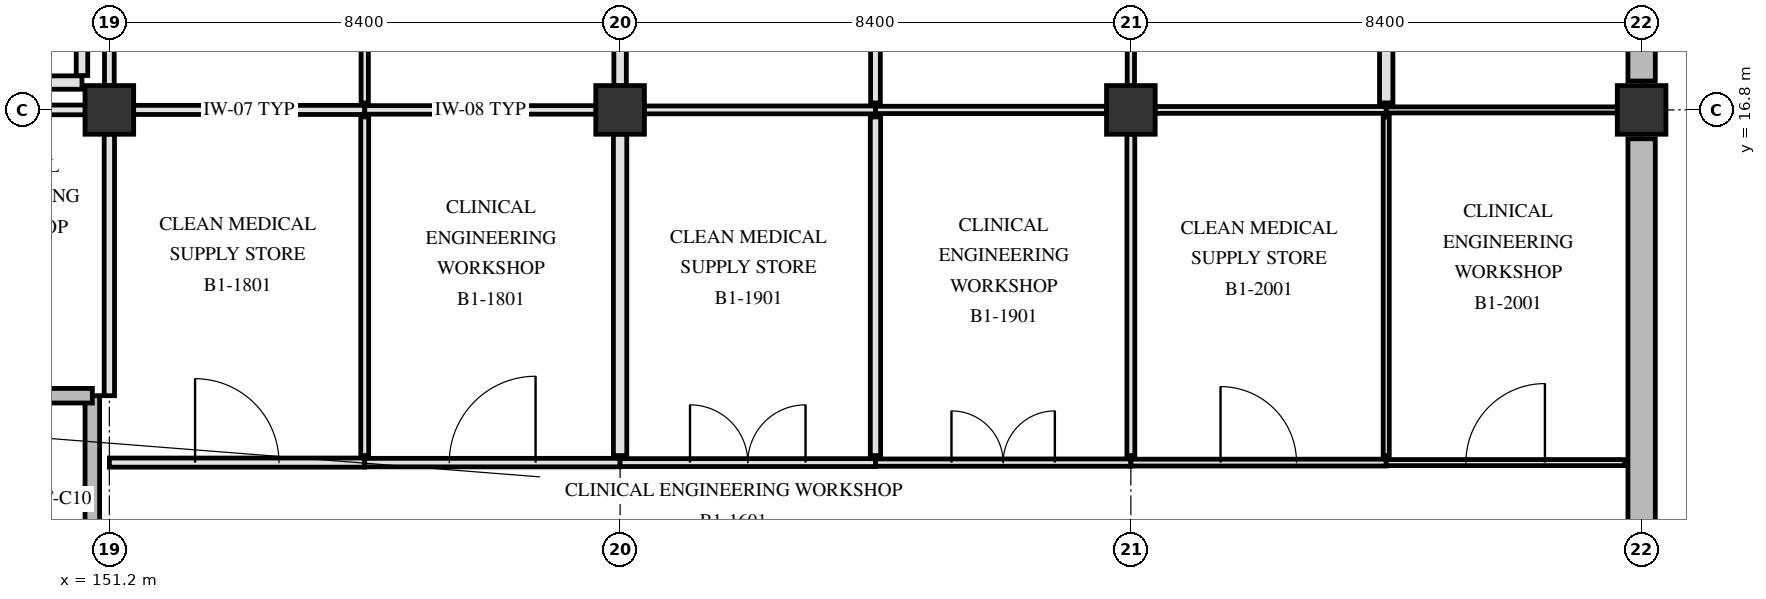
"""IFC4 building model, lengths in metres.
Left out: names, types, materials, properties, quantities, classifications, styles, units other than length and angle.
Written with IfcOpenShell. Run it as: python <this file> out.ifc"""

import sys

from ifc_helpers import new_model, si_unit, direction, frame, frame_2d, origin, origin_2d, place, context, subcontext, project, spatial, rectangle, extrude, element, fill, save


model = new_model("IFC4")
c1 = context("Model", 3, precision=1e-05, world=origin(), true_north=direction((0.0, 1.0)))
c2 = subcontext(c1, "Body", "Model", "MODEL_VIEW")
j1 = project(units=[si_unit("LENGTHUNIT", "METRE"), si_unit("PLANEANGLEUNIT", "RADIAN")], contexts=[c1])
p1 = place(None, origin())
s1 = spatial("IfcSite", under=j1, at=p1, CompositionType="ELEMENT")
p2 = place(p1, origin())
s2 = spatial("IfcBuilding", under=s1, at=p2, CompositionType="ELEMENT")
p3 = place(p2, frame((0.0, 0.0, -5.4)))
s3 = spatial("IfcBuildingStorey", under=s2, at=p3, CompositionType="ELEMENT", Elevation=-5.4)
for number, where, z_axis, x_axis in (
    (1, (151.2, 16.8, 0.0), (0.0, 0.0, 1.0), (1.0, 0.0, 0.0)),
    (2, (159.6, 16.8, 0.0), (0.0, 0.0, 1.0), (1.0, 0.0, 0.0)),
    (3, (168.0, 16.8, 0.0), (0.0, 0.0, 1.0), (1.0, 0.0, 0.0)),
    (4, (176.4, 16.8, 0.0), (0.0, 0.0, 1.0), (1.0, 0.0, 0.0)),
):
    element("IfcColumn", number, at=place(p3, frame(where, z_axis=z_axis, x_axis=x_axis)), inside=s3, PredefinedType="COLUMN", context=c2, shape_type="SweptSolid", body=[
        extrude(rectangle(XDim=0.8, YDim=0.8, at=origin_2d()), origin(), (0.0, 0.0, 1.0), 5.4),
    ])
p4 = place(p3, frame((176.4, 24.725, 0.0), z_axis=(0.0, 0.0, 1.0), x_axis=(0.0, -1.0, 0.0)))
e5 = element("IfcWall", 5, at=p4, inside=s3, PredefinedType="SOLIDWALL", context=c2, shape_type="SweptSolid", body=[
    extrude(rectangle(XDim=7.45, YDim=0.45, at=frame_2d((3.725, 0.0))), origin(), (0.0, 0.0, 1.0), 5.08),
])
p5 = place(p3, frame((176.4, 16.325, 0.0), z_axis=(0.0, 0.0, 1.0), x_axis=(0.0, -1.0, 0.0)))
e6 = element("IfcWall", 6, at=p5, inside=s3, PredefinedType="SOLIDWALL", context=c2, shape_type="SweptSolid", body=[
    extrude(rectangle(XDim=7.45, YDim=0.45, at=frame_2d((3.725, 0.0))), origin(), (0.0, 0.0, 1.0), 5.08),
])
p6 = place(p3, frame((150.92, 8.78, 0.0), z_axis=(0.0, 0.0, 1.0), x_axis=(0.0, 1.0, 0.0)))
e7 = element("IfcWall", 7, at=p6, inside=s3, PredefinedType="SHEAR", context=c2, shape_type="SweptSolid", body=[
    extrude(rectangle(XDim=3.32, YDim=0.24, at=frame_2d((1.66, 0.0))), origin(), (0.0, 0.0, 1.0), 5.08),
])
p7 = place(p3, frame((143.1, 12.1, 0.0), z_axis=(0.0, 0.0, 1.0), x_axis=(1.0, 0.0, 0.0)))
e8 = element("IfcWall", 8, at=p7, inside=s3, PredefinedType="SHEAR", context=c2, shape_type="SweptSolid", body=[
    extrude(rectangle(XDim=7.82, YDim=0.24, at=frame_2d((3.91, 0.0))), origin(), (0.0, 0.0, 1.0), 5.08),
])
p8 = place(p7, frame((0.25, 0.0, 0.0)))
e9 = element("IfcOpeningElement", 9, at=p8, cuts=e8, PredefinedType="OPENING", context=c2, shape_type="SweptSolid", body=[
    extrude(rectangle(XDim=1.45, YDim=2.2, at=frame_2d((0.725, 1.1))), frame((0.0, 0.13, 0.0), z_axis=(0.0, -1.0, 0.0), x_axis=(1.0, 0.0, 0.0)), (0.0, 0.0, 1.0), 0.26),
])
p9 = place(p3, frame((151.2, 11.0, 0.0), z_axis=(0.0, 0.0, 1.0), x_axis=(1.0, 0.0, 0.0)))
e10 = element("IfcWall", 10, at=p9, inside=s3, PredefinedType="PARTITIONING", context=c2, shape_type="SweptSolid", body=[
    extrude(rectangle(XDim=4.2, YDim=0.15, at=frame_2d((2.1, 0.0))), origin(), (0.0, 0.0, 1.0), 4.47),
])
p10 = place(p9, frame((1.41, 0.0, 0.0)))
e11 = element("IfcOpeningElement", 11, at=p10, cuts=e10, PredefinedType="OPENING", context=c2, shape_type="SweptSolid", body=[
    extrude(rectangle(XDim=1.38, YDim=2.22, at=frame_2d((0.69, 1.11))), frame((0.0, 0.085, 0.0), z_axis=(0.0, -1.0, 0.0), x_axis=(1.0, 0.0, 0.0)), (0.0, 0.0, 1.0), 0.17),
])
p11 = place(p3, frame((155.4, 11.0, 0.0), z_axis=(0.0, 0.0, 1.0), x_axis=(1.0, 0.0, 0.0)))
e12 = element("IfcWall", 12, at=p11, inside=s3, PredefinedType="PARTITIONING", context=c2, shape_type="SweptSolid", body=[
    extrude(rectangle(XDim=4.2, YDim=0.14, at=frame_2d((2.1, 0.0))), origin(), (0.0, 0.0, 1.0), 4.47),
])
p12 = place(p11, frame((1.39, 0.0, 0.0)))
e13 = element("IfcOpeningElement", 13, at=p12, cuts=e12, PredefinedType="OPENING", context=c2, shape_type="SweptSolid", body=[
    extrude(rectangle(XDim=1.42, YDim=2.22, at=frame_2d((0.71, 1.11))), frame((0.0, 0.08, 0.0), z_axis=(0.0, -1.0, 0.0), x_axis=(1.0, 0.0, 0.0)), (0.0, 0.0, 1.0), 0.16),
])
p13 = place(p3, frame((159.6, 11.0, 0.0), z_axis=(0.0, 0.0, 1.0), x_axis=(1.0, 0.0, 0.0)))
e14 = element("IfcWall", 14, at=p13, inside=s3, PredefinedType="PARTITIONING", context=c2, shape_type="SweptSolid", body=[
    extrude(rectangle(XDim=4.2, YDim=0.13, at=frame_2d((2.1, 0.0))), origin(), (0.0, 0.0, 1.0), 4.47),
])
p14 = place(p13, frame((1.15, 0.0, 0.0)))
e15 = element("IfcOpeningElement", 15, at=p14, cuts=e14, PredefinedType="OPENING", context=c2, shape_type="SweptSolid", body=[
    extrude(rectangle(XDim=1.9, YDim=2.3, at=frame_2d((0.95, 1.15))), frame((0.0, 0.075, 0.0), z_axis=(0.0, -1.0, 0.0), x_axis=(1.0, 0.0, 0.0)), (0.0, 0.0, 1.0), 0.15),
])
p15 = place(p3, frame((163.8, 11.0, 0.0), z_axis=(0.0, 0.0, 1.0), x_axis=(1.0, 0.0, 0.0)))
e16 = element("IfcWall", 16, at=p15, inside=s3, PredefinedType="PARTITIONING", context=c2, shape_type="SweptSolid", body=[
    extrude(rectangle(XDim=4.2, YDim=0.12, at=frame_2d((2.1, 0.0))), origin(), (0.0, 0.0, 1.0), 4.47),
])
p16 = place(p15, frame((1.25, 0.0, 0.0)))
e17 = element("IfcOpeningElement", 17, at=p16, cuts=e16, PredefinedType="OPENING", context=c2, shape_type="SweptSolid", body=[
    extrude(rectangle(XDim=1.7, YDim=2.25, at=frame_2d((0.85, 1.125))), frame((0.0, 0.07, 0.0), z_axis=(0.0, -1.0, 0.0), x_axis=(1.0, 0.0, 0.0)), (0.0, 0.0, 1.0), 0.14),
])
p17 = place(p3, frame((168.0, 11.0, 0.0), z_axis=(0.0, 0.0, 1.0), x_axis=(1.0, 0.0, 0.0)))
e18 = element("IfcWall", 18, at=p17, inside=s3, PredefinedType="PARTITIONING", context=c2, shape_type="SweptSolid", body=[
    extrude(rectangle(XDim=4.2, YDim=0.112, at=frame_2d((2.1, 0.0))), origin(), (0.0, 0.0, 1.0), 4.47),
])
p18 = place(p17, frame((1.475, 0.0, 0.0)))
e19 = element("IfcOpeningElement", 19, at=p18, cuts=e18, PredefinedType="OPENING", context=c2, shape_type="SweptSolid", body=[
    extrude(rectangle(XDim=1.25, YDim=2.2, at=frame_2d((0.625, 1.1))), frame((0.0, 0.066, 0.0), z_axis=(0.0, -1.0, 0.0), x_axis=(1.0, 0.0, 0.0)), (0.0, 0.0, 1.0), 0.132),
])
p19 = place(p3, frame((172.2, 11.0, 0.0), z_axis=(0.0, 0.0, 1.0), x_axis=(1.0, 0.0, 0.0)))
e20 = element("IfcWall", 20, at=p19, inside=s3, PredefinedType="PARTITIONING", context=c2, shape_type="SweptSolid", body=[
    extrude(rectangle(XDim=3.92, YDim=0.1, at=frame_2d((1.96, 0.0))), origin(), (0.0, 0.0, 1.0), 5.07),
])
p20 = place(p19, frame((1.31, 0.0, 0.0)))
e21 = element("IfcOpeningElement", 21, at=p20, cuts=e20, PredefinedType="OPENING", context=c2, shape_type="SweptSolid", body=[
    extrude(rectangle(XDim=1.3, YDim=2.2, at=frame_2d((0.65, 1.1))), frame((0.0, 0.06, 0.0), z_axis=(0.0, -1.0, 0.0), x_axis=(1.0, 0.0, 0.0)), (0.0, 0.0, 1.0), 0.12),
])
p21 = place(p3, frame((147.0, 16.8, 0.0), z_axis=(0.0, 0.0, 1.0), x_axis=(1.0, 0.0, 0.0)))
e22 = element("IfcWall", 22, at=p21, inside=s3, PredefinedType="PARTITIONING", context=c2, shape_type="SweptSolid", body=[
    extrude(rectangle(XDim=3.805, YDim=0.16, at=frame_2d((1.902, 0.0))), origin(), (0.0, 0.0, 1.0), 4.42),
])
p22 = place(p3, frame((151.595, 16.8, 0.0), z_axis=(0.0, 0.0, 1.0), x_axis=(1.0, 0.0, 0.0)))
e23 = element("IfcWall", 23, at=p22, inside=s3, PredefinedType="PARTITIONING", context=c2, shape_type="SweptSolid", body=[
    extrude(rectangle(XDim=3.805, YDim=0.15, at=frame_2d((1.902, 0.0))), origin(), (0.0, 0.0, 1.0), 4.42),
])
p23 = place(p3, frame((155.4, 16.8, 0.0), z_axis=(0.0, 0.0, 1.0), x_axis=(1.0, 0.0, 0.0)))
e24 = element("IfcWall", 24, at=p23, inside=s3, PredefinedType="PARTITIONING", context=c2, shape_type="SweptSolid", body=[
    extrude(rectangle(XDim=3.805, YDim=0.14, at=frame_2d((1.903, 0.0))), origin(), (0.0, 0.0, 1.0), 4.42),
])
p24 = place(p3, frame((159.995, 16.8, 0.0), z_axis=(0.0, 0.0, 1.0), x_axis=(1.0, 0.0, 0.0)))
e25 = element("IfcWall", 25, at=p24, inside=s3, PredefinedType="PARTITIONING", context=c2, shape_type="SweptSolid", body=[
    extrude(rectangle(XDim=3.805, YDim=0.13, at=frame_2d((1.902, 0.0))), origin(), (0.0, 0.0, 1.0), 4.42),
])
p25 = place(p3, frame((163.8, 16.8, 0.0), z_axis=(0.0, 0.0, 1.0), x_axis=(1.0, 0.0, 0.0)))
e26 = element("IfcWall", 26, at=p25, inside=s3, PredefinedType="PARTITIONING", context=c2, shape_type="SweptSolid", body=[
    extrude(rectangle(XDim=3.805, YDim=0.12, at=frame_2d((1.902, 0.0))), origin(), (0.0, 0.0, 1.0), 4.42),
])
p26 = place(p3, frame((168.395, 16.8, 0.0), z_axis=(0.0, 0.0, 1.0), x_axis=(1.0, 0.0, 0.0)))
e27 = element("IfcWall", 27, at=p26, inside=s3, PredefinedType="PARTITIONING", context=c2, shape_type="SweptSolid", body=[
    extrude(rectangle(XDim=3.805, YDim=0.112, at=frame_2d((1.902, 0.0))), origin(), (0.0, 0.0, 1.0), 4.42),
])
p27 = place(p3, frame((172.2, 16.8, 0.0), z_axis=(0.0, 0.0, 1.0), x_axis=(1.0, 0.0, 0.0)))
e28 = element("IfcWall", 28, at=p27, inside=s3, PredefinedType="PARTITIONING", context=c2, shape_type="SweptSolid", body=[
    extrude(rectangle(XDim=3.805, YDim=0.1, at=frame_2d((1.902, 0.0))), origin(), (0.0, 0.0, 1.0), 4.42),
])
p28 = place(p3, frame((147.0, 17.25, 0.0), z_axis=(0.0, 0.0, 1.0), x_axis=(1.0, 0.0, 0.0)))
e29 = element("IfcWall", 29, at=p28, inside=s3, PredefinedType="PARTITIONING", context=c2, shape_type="SweptSolid", body=[
    extrude(rectangle(XDim=3.75, YDim=0.22, at=frame_2d((1.875, 0.0))), origin(), (0.0, 0.0, 1.0), 5.07),
])
p29 = place(p3, frame((150.75, 17.365, 0.0), z_axis=(0.0, 0.0, 1.0), x_axis=(0.0, 1.0, 0.0)))
e30 = element("IfcWall", 30, at=p29, inside=s3, PredefinedType="PARTITIONING", context=c2, shape_type="SweptSolid", body=[
    extrude(rectangle(XDim=1.77, YDim=0.19, at=frame_2d((0.885, 0.0))), origin(), (0.0, 0.0, 1.0), 5.07),
])
p30 = place(p3, frame((151.2, 12.1, 0.0), z_axis=(0.0, 0.0, 1.0), x_axis=(0.0, 1.0, 0.0)))
e31 = element("IfcWall", 31, at=p30, inside=s3, PredefinedType="PARTITIONING", context=c2, shape_type="SweptSolid", body=[
    extrude(rectangle(XDim=4.305, YDim=0.17, at=frame_2d((2.152, 0.0))), origin(), (0.0, 0.0, 1.0), 4.47),
])
p31 = place(p3, frame((151.2, 17.195, 0.0), z_axis=(0.0, 0.0, 1.0), x_axis=(0.0, 1.0, 0.0)))
e32 = element("IfcWall", 32, at=p31, inside=s3, PredefinedType="PARTITIONING", context=c2, shape_type="SweptSolid", body=[
    extrude(rectangle(XDim=5.29, YDim=0.16, at=frame_2d((2.645, 0.0))), origin(), (0.0, 0.0, 1.0), 4.47),
])
p32 = place(p3, frame((155.4, 11.115, 0.0), z_axis=(0.0, 0.0, 1.0), x_axis=(0.0, 1.0, 0.0)))
e33 = element("IfcWall", 33, at=p32, inside=s3, PredefinedType="PARTITIONING", context=c2, shape_type="SweptSolid", body=[
    extrude(rectangle(XDim=5.57, YDim=0.13, at=frame_2d((2.785, 0.0))), origin(), (0.0, 0.0, 1.0), 4.42),
])
p33 = place(p3, frame((155.4, 16.915, 0.0), z_axis=(0.0, 0.0, 1.0), x_axis=(0.0, 1.0, 0.0)))
e34 = element("IfcWall", 34, at=p33, inside=s3, PredefinedType="PARTITIONING", context=c2, shape_type="SweptSolid", body=[
    extrude(rectangle(XDim=5.57, YDim=0.12, at=frame_2d((2.785, 0.0))), origin(), (0.0, 0.0, 1.0), 4.42),
])
p34 = place(p3, frame((159.6, 11.115, 0.0), z_axis=(0.0, 0.0, 1.0), x_axis=(0.0, 1.0, 0.0)))
e35 = element("IfcWall", 35, at=p34, inside=s3, PredefinedType="PARTITIONING", context=c2, shape_type="SweptSolid", body=[
    extrude(rectangle(XDim=5.29, YDim=0.22, at=frame_2d((2.645, 0.0))), origin(), (0.0, 0.0, 1.0), 4.47),
])
p35 = place(p3, frame((159.6, 17.195, 0.0), z_axis=(0.0, 0.0, 1.0), x_axis=(0.0, 1.0, 0.0)))
e36 = element("IfcWall", 36, at=p35, inside=s3, PredefinedType="PARTITIONING", context=c2, shape_type="SweptSolid", body=[
    extrude(rectangle(XDim=5.29, YDim=0.205, at=frame_2d((2.645, 0.0))), origin(), (0.0, 0.0, 1.0), 4.47),
])
p36 = place(p3, frame((163.8, 11.115, 0.0), z_axis=(0.0, 0.0, 1.0), x_axis=(0.0, 1.0, 0.0)))
e37 = element("IfcWall", 37, at=p36, inside=s3, PredefinedType="PARTITIONING", context=c2, shape_type="SweptSolid", body=[
    extrude(rectangle(XDim=5.57, YDim=0.17, at=frame_2d((2.785, 0.0))), origin(), (0.0, 0.0, 1.0), 4.42),
])
p37 = place(p3, frame((163.8, 16.915, 0.0), z_axis=(0.0, 0.0, 1.0), x_axis=(0.0, 1.0, 0.0)))
e38 = element("IfcWall", 38, at=p37, inside=s3, PredefinedType="PARTITIONING", context=c2, shape_type="SweptSolid", body=[
    extrude(rectangle(XDim=5.57, YDim=0.16, at=frame_2d((2.785, 0.0))), origin(), (0.0, 0.0, 1.0), 4.42),
])
p38 = place(p3, frame((168.0, 11.115, 0.0), z_axis=(0.0, 0.0, 1.0), x_axis=(0.0, 1.0, 0.0)))
e39 = element("IfcWall", 39, at=p38, inside=s3, PredefinedType="PARTITIONING", context=c2, shape_type="SweptSolid", body=[
    extrude(rectangle(XDim=5.29, YDim=0.13, at=frame_2d((2.645, 0.0))), origin(), (0.0, 0.0, 1.0), 4.47),
])
p39 = place(p3, frame((168.0, 17.195, 0.0), z_axis=(0.0, 0.0, 1.0), x_axis=(0.0, 1.0, 0.0)))
e40 = element("IfcWall", 40, at=p39, inside=s3, PredefinedType="PARTITIONING", context=c2, shape_type="SweptSolid", body=[
    extrude(rectangle(XDim=5.29, YDim=0.12, at=frame_2d((2.645, 0.0))), origin(), (0.0, 0.0, 1.0), 4.47),
])
p40 = place(p3, frame((172.2, 11.115, 0.0), z_axis=(0.0, 0.0, 1.0), x_axis=(0.0, 1.0, 0.0)))
e41 = element("IfcWall", 41, at=p40, inside=s3, PredefinedType="PARTITIONING", context=c2, shape_type="SweptSolid", body=[
    extrude(rectangle(XDim=5.57, YDim=0.1, at=frame_2d((2.785, 0.0))), origin(), (0.0, 0.0, 1.0), 4.42),
])
p41 = place(p3, frame((172.2, 16.915, 0.0), z_axis=(0.0, 0.0, 1.0), x_axis=(0.0, 1.0, 0.0)))
e42 = element("IfcWall", 42, at=p41, inside=s3, PredefinedType="PARTITIONING", context=c2, shape_type="SweptSolid", body=[
    extrude(rectangle(XDim=5.57, YDim=0.22, at=frame_2d((2.785, 0.0))), origin(), (0.0, 0.0, 1.0), 4.42),
])
p42 = place(p10, origin())
e43 = element("IfcDoor", 43, at=p42, inside=s3, OperationType="SINGLE_SWING_LEFT", PredefinedType="DOOR", context=c2, shape_type="SweptSolid", body=[
    extrude(rectangle(XDim=1.38, YDim=2.22, at=frame_2d((0.69, 1.11))), frame((0.0, 0.025, 0.0), z_axis=(0.0, -1.0, 0.0), x_axis=(1.0, 0.0, 0.0)), (0.0, 0.0, 1.0), 0.05),
])
fill(e11, e43)
p43 = place(p12, origin())
e44 = element("IfcDoor", 44, at=p43, inside=s3, OperationType="SINGLE_SWING_RIGHT", PredefinedType="DOOR", context=c2, shape_type="SweptSolid", body=[
    extrude(rectangle(XDim=1.42, YDim=2.22, at=frame_2d((0.71, 1.11))), frame((0.0, 0.025, 0.0), z_axis=(0.0, -1.0, 0.0), x_axis=(1.0, 0.0, 0.0)), (0.0, 0.0, 1.0), 0.05),
])
fill(e13, e44)
p44 = place(p14, origin())
e45 = element("IfcDoor", 45, at=p44, inside=s3, OperationType="DOUBLE_SWING_LEFT", PredefinedType="DOOR", context=c2, shape_type="SweptSolid", body=[
    extrude(rectangle(XDim=1.9, YDim=2.3, at=frame_2d((0.95, 1.15))), frame((0.0, 0.025, 0.0), z_axis=(0.0, -1.0, 0.0), x_axis=(1.0, 0.0, 0.0)), (0.0, 0.0, 1.0), 0.05),
])
fill(e15, e45)
p45 = place(p16, origin())
e46 = element("IfcDoor", 46, at=p45, inside=s3, OperationType="DOUBLE_SWING_RIGHT", PredefinedType="DOOR", context=c2, shape_type="SweptSolid", body=[
    extrude(rectangle(XDim=1.7, YDim=2.25, at=frame_2d((0.85, 1.125))), frame((0.0, 0.025, 0.0), z_axis=(0.0, -1.0, 0.0), x_axis=(1.0, 0.0, 0.0)), (0.0, 0.0, 1.0), 0.05),
])
fill(e17, e46)
p46 = place(p18, origin())
e47 = element("IfcDoor", 47, at=p46, inside=s3, OperationType="SINGLE_SWING_LEFT", PredefinedType="DOOR", context=c2, shape_type="SweptSolid", body=[
    extrude(rectangle(XDim=1.25, YDim=2.2, at=frame_2d((0.625, 1.1))), frame((0.0, 0.025, 0.0), z_axis=(0.0, -1.0, 0.0), x_axis=(1.0, 0.0, 0.0)), (0.0, 0.0, 1.0), 0.05),
])
fill(e19, e47)
p47 = place(p20, origin())
e48 = element("IfcDoor", 48, at=p47, inside=s3, OperationType="SINGLE_SWING_RIGHT", PredefinedType="DOOR", context=c2, shape_type="SweptSolid", body=[
    extrude(rectangle(XDim=1.3, YDim=2.2, at=frame_2d((0.65, 1.1))), frame((0.0, 0.025, 0.0), z_axis=(0.0, -1.0, 0.0), x_axis=(1.0, 0.0, 0.0)), (0.0, 0.0, 1.0), 0.05),
])
fill(e21, e48)
save(model, sys.argv[1])
